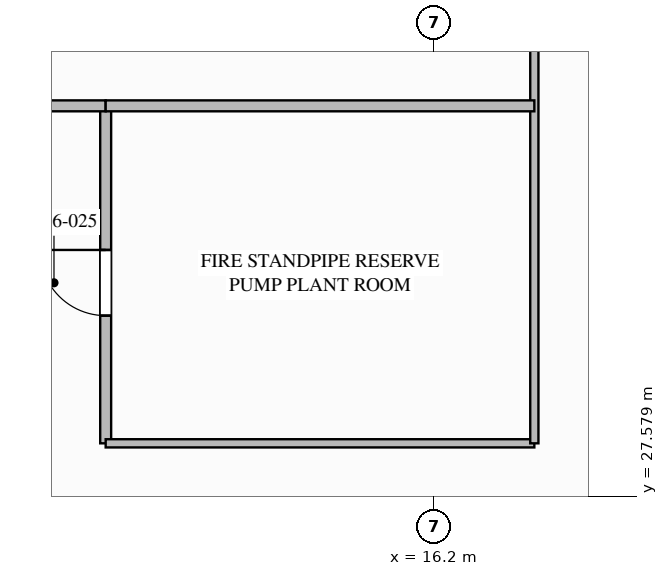
"""IFC4 building model, lengths in metres.
Left out: names, types, materials, properties, quantities, classifications, styles, units other than length and angle.
Written with IfcOpenShell. Run it as: python <this file> out.ifc"""

import sys

from ifc_helpers import new_model, si_unit, direction, frame, frame_2d, origin, place, context, subcontext, project, spatial, rectangle, extrude, element, fill, save


model = new_model("IFC4")
c1 = context("Model", 3, precision=1e-05, world=origin(), true_north=direction((0.0, 1.0)))
c2 = subcontext(c1, "Body", "Model", "MODEL_VIEW")
j1 = project(units=[si_unit("LENGTHUNIT", "METRE"), si_unit("PLANEANGLEUNIT", "RADIAN")], contexts=[c1])
p1 = place(None, origin())
s1 = spatial("IfcSite", under=j1, at=p1, CompositionType="ELEMENT")
p2 = place(p1, origin())
s2 = spatial("IfcBuilding", under=s1, at=p2, CompositionType="ELEMENT")
p3 = place(p2, frame((0.0, 0.0, 140.8)))
s3 = spatial("IfcBuildingStorey", under=s2, at=p3, CompositionType="ELEMENT", Elevation=140.8)
p4 = place(p3, frame((10.8, 28.45, 0.0), z_axis=(0.0, 0.0, 1.0), x_axis=(0.0, 1.0, 0.0)))
e1 = element("IfcWall", 1, at=p4, inside=s3, PredefinedType="SOLIDWALL", context=c2, shape_type="SweptSolid", body=[
    extrude(rectangle(XDim=5.55, YDim=0.18, at=frame_2d((2.775, 0.0))), origin(), (0.0, 0.0, 1.0), 4.7),
])
p5 = place(p4, frame((2.1, 0.0, 0.0)))
e2 = element("IfcOpeningElement", 2, at=p5, cuts=e1, PredefinedType="OPENING", context=c2, shape_type="SweptSolid", body=[
    extrude(rectangle(XDim=1.08, YDim=2.04, at=frame_2d((0.54, 1.02))), frame((0.0, 0.1, 0.0), z_axis=(0.0, -1.0, 0.0), x_axis=(1.0, 0.0, 0.0)), (0.0, 0.0, 1.0), 0.2),
])
p6 = place(p3, frame((8.7, 34.0, 0.0), z_axis=(0.0, 0.0, 1.0), x_axis=(1.0, 0.0, 0.0)))
e3 = element("IfcWall", 3, at=p6, inside=s3, PredefinedType="SOLIDWALL", context=c2, shape_type="SweptSolid", body=[
    extrude(rectangle(XDim=2.1, YDim=0.18, at=frame_2d((1.05, 0.0))), origin(), (0.0, 0.0, 1.0), 4.7),
])
p7 = place(p3, frame((10.8, 28.45, 0.0), z_axis=(0.0, 0.0, 1.0), x_axis=(1.0, 0.0, 0.0)))
e4 = element("IfcWall", 4, at=p7, inside=s3, PredefinedType="PARTITIONING", context=c2, shape_type="SweptSolid", body=[
    extrude(rectangle(XDim=7.05, YDim=0.135, at=frame_2d((3.525, 0.0))), origin(), (0.0, 0.0, 1.0), 4.7),
])
p8 = place(p3, frame((17.85, 28.45, 0.0), z_axis=(0.0, 0.0, 1.0), x_axis=(0.0, 1.0, 0.0)))
e5 = element("IfcWall", 5, at=p8, inside=s3, PredefinedType="PARTITIONING", context=c2, shape_type="SweptSolid", body=[
    extrude(rectangle(XDim=16.55, YDim=0.135, at=frame_2d((8.275, 0.0))), origin(), (0.0, 0.0, 1.0), 4.7),
])
p9 = place(p3, frame((10.8, 34.0, 0.0), z_axis=(0.0, 0.0, 1.0), x_axis=(1.0, 0.0, 0.0)))
e6 = element("IfcWall", 6, at=p9, inside=s3, PredefinedType="SOLIDWALL", context=c2, shape_type="SweptSolid", body=[
    extrude(rectangle(XDim=7.05, YDim=0.18, at=frame_2d((3.525, 0.0))), origin(), (0.0, 0.0, 1.0), 4.7),
])
p10 = place(p5, origin())
e7 = element("IfcDoor", 7, at=p10, inside=s3, OperationType="SINGLE_SWING_RIGHT", PredefinedType="DOOR", context=c2, shape_type="SweptSolid", body=[
    extrude(rectangle(XDim=1.08, YDim=2.04, at=frame_2d((0.54, 1.02))), frame((0.0, 0.025, 0.0), z_axis=(0.0, -1.0, 0.0), x_axis=(1.0, 0.0, 0.0)), (0.0, 0.0, 1.0), 0.05),
])
fill(e2, e7)
save(model, sys.argv[1])
